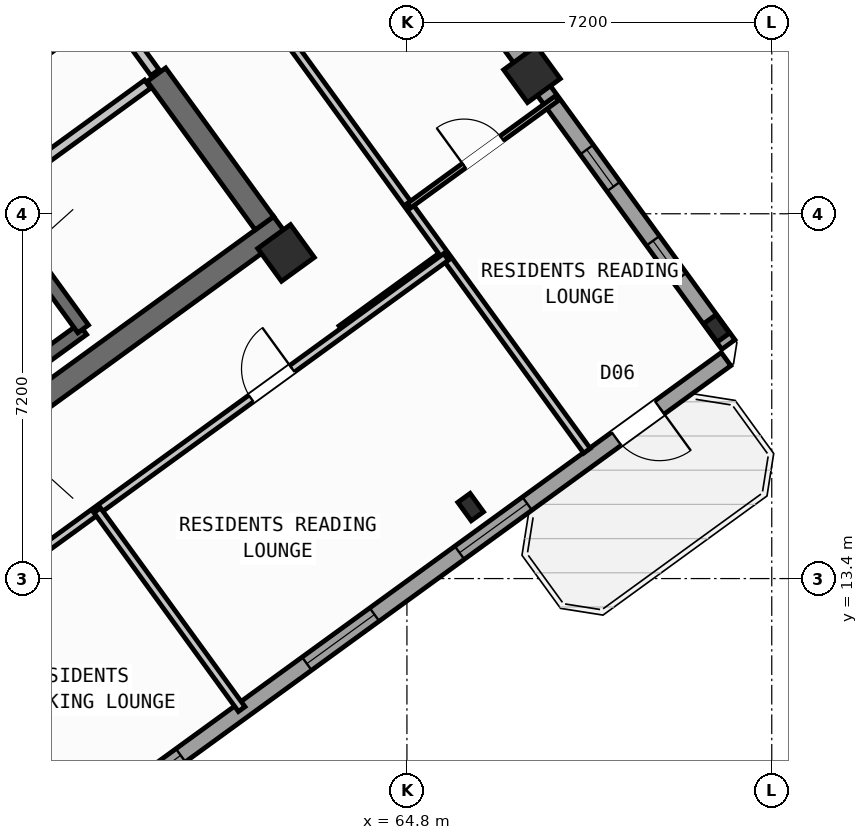
"""IFC4 building model, lengths in metres.
Left out: names, types, materials, properties, quantities, classifications, styles, units other than length and angle.
Written with IfcOpenShell. Run it as: python <this file> out.ifc"""

import sys

from ifc_helpers import new_model, si_unit, direction, frame, frame_2d, origin, origin_2d, place, context, subcontext, project, spatial, rectangle, hollow_rectangle, i_section, extrude, source, transform, mapped, element, fill, save


model = new_model("IFC4")
c1 = context("Model", 3, precision=1e-05, world=origin(), true_north=direction((0.0, 1.0)))
c2 = subcontext(c1, "Body", "Model", "MODEL_VIEW")
j1 = project(units=[si_unit("LENGTHUNIT", "METRE"), si_unit("PLANEANGLEUNIT", "RADIAN")], contexts=[c1])
p1 = place(None, origin())
s1 = spatial("IfcSite", under=j1, at=p1, CompositionType="ELEMENT")
p2 = place(p1, origin())
s2 = spatial("IfcBuilding", under=s1, at=p2, CompositionType="ELEMENT")
p3 = place(p2, frame((0.0, 0.0, 238.5)))
s3 = spatial("IfcBuildingStorey", under=s2, at=p3, CompositionType="ELEMENT", Elevation=238.5)
p4 = place(p3, frame((52.399, 13.169, 0.0), z_axis=(0.0, 0.0, 1.0), x_axis=(0.809022352778, 0.587777877013, 0.0)))
e1 = element("IfcWall", 1, at=p4, inside=s3, PredefinedType="SHEAR", context=c2, shape_type="SweptSolid", body=[
    extrude(rectangle(XDim=12.24, YDim=0.45, at=frame_2d((6.12, 0.0))), origin(), (0.0, 0.0, 1.0), 3.35),
])
p5 = place(p3, frame((61.988, 20.413, 0.0), z_axis=(0.0, 0.0, 1.0), x_axis=(-0.587819244441, 0.808992296542, 0.0)))
e2 = element("IfcWall", 2, at=p5, inside=s3, PredefinedType="SHEAR", context=c2, shape_type="SweptSolid", body=[
    extrude(rectangle(XDim=3.625, YDim=0.45, at=frame_2d((1.812, 0.0))), origin(), (0.0, 0.0, 1.0), 3.35),
])
m1 = source(origin(), c2, "Body", "SweptSolid", [
    extrude(i_section(OverallWidth=0.3, OverallDepth=0.45, WebThickness=0.014, FlangeThickness=0.026, at=origin_2d()), origin(), (0.0, 0.0, 1.0), 3.6),
])
p6 = place(p3, frame((66.058, 14.811, 0.0), z_axis=(0.0, 0.0, 1.0), x_axis=(0.809016994375, 0.587785252292, 0.0)))
e3 = element("IfcColumn", 3, at=p6, inside=s3, PredefinedType="COLUMN", context=c2, shape_type="MappedRepresentation", body=[
    mapped(m1, transform((0.0, 0.0, 0.0), scale=1.0)),
])
m2 = source(origin(), c2, "Body", "SweptSolid", [
    extrude(hollow_rectangle(XDim=0.8, YDim=0.8, WallThickness=0.032, at=origin_2d()), origin(), (0.0, 0.0, 1.0), 3.6),
])
p7 = place(p3, frame((62.414, 19.827, 0.0), z_axis=(0.0, 0.0, 1.0), x_axis=(0.809016994375, 0.587785252292, 0.0)))
e4 = element("IfcColumn", 4, at=p7, inside=s3, PredefinedType="COLUMN", context=c2, shape_type="MappedRepresentation", body=[
    mapped(m2, transform((0.0, 0.0, 0.0), scale=1.0)),
])
p8 = place(p3, frame((70.912, 18.338, 0.0), z_axis=(0.0, 0.0, 1.0), x_axis=(0.809016994375, 0.587785252292, 0.0)))
e5 = element("IfcColumn", 5, at=p8, inside=s3, PredefinedType="COLUMN", context=c2, shape_type="MappedRepresentation", body=[
    mapped(m1, transform((0.0, 0.0, 0.0), scale=1.0)),
])
p9 = place(p3, frame((67.268, 23.354, 0.0), z_axis=(0.0, 0.0, 1.0), x_axis=(0.809016994375, 0.587785252292, 0.0)))
e6 = element("IfcColumn", 6, at=p9, inside=s3, PredefinedType="COLUMN", context=c2, shape_type="MappedRepresentation", body=[
    mapped(m2, transform((0.0, 0.0, 0.0), scale=1.0)),
])
p10 = place(p3, frame((58.455, 35.484, 0.0), z_axis=(0.0, 0.0, 1.0), x_axis=(0.587783625747, -0.809018176127, 0.0)))
e7 = element("IfcWall", 7, at=p10, inside=s3, PredefinedType="STANDARD", context=c2, shape_type="SweptSolid", body=[
    extrude(rectangle(XDim=21.587, YDim=0.32, at=frame_2d((10.794, 0.0))), origin(), (0.0, 0.0, 1.0), 2.875),
])
p11 = place(p10, frame((1.554, 0.0, 0.9)))
e8 = element("IfcOpeningElement", 8, at=p11, cuts=e7, PredefinedType="OPENING", context=c2, shape_type="SweptSolid", body=[
    extrude(rectangle(XDim=1.65, YDim=1.45, at=frame_2d((0.825, 0.725))), frame((0.0, 0.17, 0.0), z_axis=(0.0, -1.0, 0.0), x_axis=(1.0, 0.0, 0.0)), (0.0, 0.0, 1.0), 0.34),
])
p12 = place(p10, frame((9.219, 0.0, 0.9)))
e9 = element("IfcOpeningElement", 9, at=p12, cuts=e7, PredefinedType="OPENING", context=c2, shape_type="SweptSolid", body=[
    extrude(rectangle(XDim=1.35, YDim=1.45, at=frame_2d((0.675, 0.725))), frame((0.0, 0.17, 0.0), z_axis=(0.0, -1.0, 0.0), x_axis=(1.0, 0.0, 0.0)), (0.0, 0.0, 1.0), 0.34),
])
p13 = place(p10, frame((12.119, 0.0, 0.9)))
e10 = element("IfcOpeningElement", 10, at=p13, cuts=e7, PredefinedType="OPENING", context=c2, shape_type="SweptSolid", body=[
    extrude(rectangle(XDim=1.35, YDim=1.45, at=frame_2d((0.675, 0.725))), frame((0.0, 0.17, 0.0), z_axis=(0.0, -1.0, 0.0), x_axis=(1.0, 0.0, 0.0)), (0.0, 0.0, 1.0), 0.34),
])
p14 = place(p10, frame((16.833, 0.0, 1.0)))
e11 = element("IfcOpeningElement", 11, at=p14, cuts=e7, PredefinedType="OPENING", context=c2, shape_type="SweptSolid", body=[
    extrude(rectangle(XDim=0.9, YDim=1.25, at=frame_2d((0.45, 0.625))), frame((0.0, 0.17, 0.0), z_axis=(0.0, -1.0, 0.0), x_axis=(1.0, 0.0, 0.0)), (0.0, 0.0, 1.0), 0.34),
])
p15 = place(p10, frame((19.057, 0.0, 1.0)))
e12 = element("IfcOpeningElement", 12, at=p15, cuts=e7, PredefinedType="OPENING", context=c2, shape_type="SweptSolid", body=[
    extrude(rectangle(XDim=0.9, YDim=1.25, at=frame_2d((0.45, 0.625))), frame((0.0, 0.17, 0.0), z_axis=(0.0, -1.0, 0.0), x_axis=(1.0, 0.0, 0.0)), (0.0, 0.0, 1.0), 0.34),
])
p16 = place(p3, frame((71.098, 17.731, 0.0), z_axis=(0.0, 0.0, 1.0), x_axis=(-0.809021120468, -0.587779573171, 0.0)))
e13 = element("IfcWall", 13, at=p16, inside=s3, PredefinedType="STANDARD", context=c2, shape_type="SweptSolid", body=[
    extrude(rectangle(XDim=17.588, YDim=0.32, at=frame_2d((8.794, 0.0))), origin(), (0.0, 0.0, 1.0), 3.35),
])
p17 = place(p16, frame((1.624, 0.0, 0.0)))
e14 = element("IfcOpeningElement", 14, at=p17, cuts=e13, PredefinedType="OPENING", context=c2, shape_type="SweptSolid", body=[
    extrude(rectangle(XDim=1.05, YDim=2.15, at=frame_2d((0.525, 1.075))), frame((0.0, 0.17, 0.0), z_axis=(0.0, -1.0, 0.0), x_axis=(1.0, 0.0, 0.0)), (0.0, 0.0, 1.0), 0.34),
])
p18 = place(p16, frame((4.851, 0.0, 0.9)))
e15 = element("IfcOpeningElement", 15, at=p18, cuts=e13, PredefinedType="OPENING", context=c2, shape_type="SweptSolid", body=[
    extrude(rectangle(XDim=1.65, YDim=1.45, at=frame_2d((0.825, 0.725))), frame((0.0, 0.17, 0.0), z_axis=(0.0, -1.0, 0.0), x_axis=(1.0, 0.0, 0.0)), (0.0, 0.0, 1.0), 0.34),
])
p19 = place(p16, frame((8.576, 0.0, 0.9)))
e16 = element("IfcOpeningElement", 16, at=p19, cuts=e13, PredefinedType="OPENING", context=c2, shape_type="SweptSolid", body=[
    extrude(rectangle(XDim=1.65, YDim=1.45, at=frame_2d((0.825, 0.725))), frame((0.0, 0.17, 0.0), z_axis=(0.0, -1.0, 0.0), x_axis=(1.0, 0.0, 0.0)), (0.0, 0.0, 1.0), 0.34),
])
p20 = place(p16, frame((13.304, 0.0, 0.95)))
e17 = element("IfcOpeningElement", 17, at=p20, cuts=e13, PredefinedType="OPENING", context=c2, shape_type="SweptSolid", body=[
    extrude(rectangle(XDim=1.95, YDim=1.35, at=frame_2d((0.975, 0.675))), frame((0.0, 0.17, 0.0), z_axis=(0.0, -1.0, 0.0), x_axis=(1.0, 0.0, 0.0)), (0.0, 0.0, 1.0), 0.34),
])
p21 = place(p3, frame((52.472, 14.013, 0.0), z_axis=(0.0, 0.0, 1.0), x_axis=(0.809028366311, 0.587769599847, 0.0)))
e18 = element("IfcWall", 18, at=p21, inside=s3, PredefinedType="SHEAR", context=c2, shape_type="SweptSolid", body=[
    extrude(rectangle(XDim=7.33, YDim=0.26, at=frame_2d((3.665, 0.0))), origin(), (0.0, 0.0, 1.0), 3.35),
])
p22 = place(p3, frame((58.41, 18.327, 0.0), z_axis=(0.0, 0.0, 1.0), x_axis=(-0.58776738483, 0.809029975545, 0.0)))
e19 = element("IfcWall", 19, at=p22, inside=s3, PredefinedType="SHEAR", context=c2, shape_type="SweptSolid", body=[
    extrude(rectangle(XDim=3.16, YDim=0.26, at=frame_2d((1.58, 0.0))), origin(), (0.0, 0.0, 1.0), 3.35),
])
p23 = place(p3, frame((56.553, 20.884, 0.0), z_axis=(0.0, 0.0, 1.0), x_axis=(0.809041669066, 0.587751288995, 0.0)))
e20 = element("IfcWall", 20, at=p23, inside=s3, PredefinedType="STANDARD", context=c2, shape_type="SweptSolid", body=[
    extrude(rectangle(XDim=3.868, YDim=0.2, at=frame_2d((1.934, 0.0))), origin(), (0.0, 0.0, 1.0), 3.34),
])
p24 = place(p23, frame((0.55, 0.0, 0.0)))
e21 = element("IfcOpeningElement", 21, at=p24, cuts=e20, PredefinedType="OPENING", context=c2, shape_type="SweptSolid", body=[
    extrude(rectangle(XDim=0.86, YDim=2.05, at=frame_2d((0.43, 1.025))), frame((0.0, 0.11, 0.0), z_axis=(0.0, -1.0, 0.0), x_axis=(1.0, 0.0, 0.0)), (0.0, 0.0, 1.0), 0.22),
])
p25 = place(p3, frame((54.421, 21.436, 0.0), z_axis=(0.0, 0.0, 1.0), x_axis=(0.809013710463, 0.587789772183, 0.0)))
e22 = element("IfcWall", 22, at=p25, inside=s3, PredefinedType="PARTITIONING", context=c2, shape_type="SweptSolid", body=[
    extrude(rectangle(XDim=5.36, YDim=0.16, at=frame_2d((2.68, 0.0))), origin(), (0.0, 0.0, 1.0), 3.34),
])
p26 = place(p25, frame((1.4, 0.0, 0.0)))
e23 = element("IfcOpeningElement", 23, at=p26, cuts=e22, PredefinedType="OPENING", context=c2, shape_type="SweptSolid", body=[
    extrude(rectangle(XDim=0.86, YDim=2.05, at=frame_2d((0.43, 1.025))), frame((0.0, 0.09, 0.0), z_axis=(0.0, -1.0, 0.0), x_axis=(1.0, 0.0, 0.0)), (0.0, 0.0, 1.0), 0.18),
])
p27 = place(p3, frame((53.425, 22.468, 0.0), z_axis=(0.0, 0.0, 1.0), x_axis=(0.809015945709, 0.587786695655, 0.0)))
e24 = element("IfcWall", 24, at=p27, inside=s3, PredefinedType="STANDARD", context=c2, shape_type="SweptSolid", body=[
    extrude(rectangle(XDim=5.468, YDim=0.2, at=frame_2d((2.734, 0.0))), origin(), (0.0, 0.0, 1.0), 3.34),
])
p28 = place(p27, frame((4.4, 0.0, 0.0)))
e25 = element("IfcOpeningElement", 25, at=p28, cuts=e24, PredefinedType="OPENING", context=c2, shape_type="SweptSolid", body=[
    extrude(rectangle(XDim=0.86, YDim=2.05, at=frame_2d((0.43, 1.025))), frame((0.0, 0.11, 0.0), z_axis=(0.0, -1.0, 0.0), x_axis=(1.0, 0.0, 0.0)), (0.0, 0.0, 1.0), 0.22),
])
p29 = place(p27, frame((1.45, 0.0, 0.0)))
e26 = element("IfcOpeningElement", 26, at=p29, cuts=e24, PredefinedType="OPENING", context=c2, shape_type="SweptSolid", body=[
    extrude(rectangle(XDim=0.86, YDim=2.05, at=frame_2d((0.43, 1.025))), frame((0.0, 0.11, 0.0), z_axis=(0.0, -1.0, 0.0), x_axis=(1.0, 0.0, 0.0)), (0.0, 0.0, 1.0), 0.22),
])
p30 = place(p3, frame((59.827, 23.386, 0.0), z_axis=(0.0, 0.0, 1.0), x_axis=(-0.587803840107, 0.809003489211, 0.0)))
e27 = element("IfcWall", 27, at=p30, inside=s3, PredefinedType="STANDARD", context=c2, shape_type="SweptSolid", body=[
    extrude(rectangle(XDim=2.96, YDim=0.2, at=frame_2d((1.48, 0.0))), origin(), (0.0, 0.0, 1.0), 3.34),
])
p31 = place(p30, frame((1.68, 0.0, 0.0)))
e28 = element("IfcOpeningElement", 28, at=p31, cuts=e27, PredefinedType="OPENING", context=c2, shape_type="SweptSolid", body=[
    extrude(rectangle(XDim=1.0, YDim=2.1, at=frame_2d((0.5, 1.05))), frame((0.0, 0.11, 0.0), z_axis=(0.0, -1.0, 0.0), x_axis=(1.0, 0.0, 0.0)), (0.0, 0.0, 1.0), 0.22),
])
p32 = place(p3, frame((63.507, 18.322, 0.0), z_axis=(0.0, 0.0, 1.0), x_axis=(0.809034604122, 0.587761013791, 0.0)))
e29 = element("IfcWall", 29, at=p32, inside=s3, PredefinedType="PARTITIONING", context=c2, shape_type="SweptSolid", body=[
    extrude(rectangle(XDim=2.51, YDim=0.16, at=frame_2d((1.255, 0.0))), origin(), (0.0, 0.0, 1.0), 3.34),
])
p33 = place(p3, frame((68.353, 15.922, 0.0), z_axis=(0.0, 0.0, 1.0), x_axis=(-0.587782002009, 0.809019355834, 0.0)))
e30 = element("IfcWall", 30, at=p33, inside=s3, PredefinedType="PARTITIONING", context=c2, shape_type="SweptSolid", body=[
    extrude(rectangle(XDim=15.35, YDim=0.16, at=frame_2d((7.675, 0.0))), origin(), (0.0, 0.0, 1.0), 3.34),
])
p34 = place(p3, frame((64.839, 20.759, 0.0), z_axis=(0.0, 0.0, 1.0), x_axis=(0.809013833588, 0.587789602718, 0.0)))
e31 = element("IfcWall", 31, at=p34, inside=s3, PredefinedType="PARTITIONING", context=c2, shape_type="SweptSolid", body=[
    extrude(rectangle(XDim=3.61, YDim=0.11, at=frame_2d((1.805, 0.0))), origin(), (0.0, 0.0, 1.0), 3.34),
])
p35 = place(p34, frame((1.345, 0.0, 0.0)))
e32 = element("IfcOpeningElement", 32, at=p35, cuts=e31, PredefinedType="OPENING", context=c2, shape_type="SweptSolid", body=[
    extrude(rectangle(XDim=0.92, YDim=2.08, at=frame_2d((0.46, 1.04))), frame((0.0, 0.065, 0.0), z_axis=(0.0, -1.0, 0.0), x_axis=(1.0, 0.0, 0.0)), (0.0, 0.0, 1.0), 0.13),
])
p36 = place(p3, frame((53.705, 11.126, 0.0), z_axis=(0.0, 0.0, 1.0), x_axis=(0.809014504436, 0.587788679384, 0.0)))
e33 = element("IfcWall", 33, at=p36, inside=s3, PredefinedType="PARTITIONING", context=c2, shape_type="SweptSolid", body=[
    extrude(rectangle(XDim=14.67, YDim=0.16, at=frame_2d((7.335, 0.0))), origin(), (0.0, 0.0, 1.0), 3.34),
])
p37 = place(p36, frame((3.215, 0.0, 0.0)))
e34 = element("IfcOpeningElement", 34, at=p37, cuts=e33, PredefinedType="OPENING", context=c2, shape_type="SweptSolid", body=[
    extrude(rectangle(XDim=1.0, YDim=2.1, at=frame_2d((0.5, 1.05))), frame((0.0, 0.09, 0.0), z_axis=(0.0, -1.0, 0.0), x_axis=(1.0, 0.0, 0.0)), (0.0, 0.0, 1.0), 0.18),
])
p38 = place(p36, frame((9.915, 0.0, 0.0)))
e35 = element("IfcOpeningElement", 35, at=p38, cuts=e33, PredefinedType="OPENING", context=c2, shape_type="SweptSolid", body=[
    extrude(rectangle(XDim=1.0, YDim=2.1, at=frame_2d((0.5, 1.05))), frame((0.0, 0.09, 0.0), z_axis=(0.0, -1.0, 0.0), x_axis=(1.0, 0.0, 0.0)), (0.0, 0.0, 1.0), 0.18),
])
p39 = place(p3, frame((57.747, 7.586, 0.0), z_axis=(0.0, 0.0, 1.0), x_axis=(-0.587784893399, 0.809017255126, 0.0)))
e36 = element("IfcWall", 36, at=p39, inside=s3, PredefinedType="PARTITIONING", context=c2, shape_type="SweptSolid", body=[
    extrude(rectangle(XDim=5.48, YDim=0.16, at=frame_2d((2.74, 0.0))), origin(), (0.0, 0.0, 1.0), 3.34),
])
p40 = place(p3, frame((61.539, 10.823, 0.0), z_axis=(0.0, 0.0, 1.0), x_axis=(-0.587785532001, 0.809016791155, 0.0)))
e37 = element("IfcWall", 37, at=p40, inside=s3, PredefinedType="PARTITIONING", context=c2, shape_type="SweptSolid", body=[
    extrude(rectangle(XDim=4.85, YDim=0.16, at=frame_2d((2.425, 0.0))), origin(), (0.0, 0.0, 1.0), 3.34),
])
m3 = source(origin(), c2, "Body", "SweptSolid", [
    extrude(rectangle(XDim=1.05, YDim=2.15, at=frame_2d((0.525, 1.075))), frame((0.0, 0.025, 0.0), z_axis=(0.0, -1.0, 0.0), x_axis=(1.0, 0.0, 0.0)), (0.0, 0.0, 1.0), 0.05),
])
p41 = place(p17, origin())
e38 = element("IfcDoor", 38, at=p41, inside=s3, OperationType="SINGLE_SWING_LEFT", PredefinedType="DOOR", context=c2, shape_type="MappedRepresentation", body=[
    mapped(m3, transform((0.0, 0.0, 0.0), scale=1.0)),
])
fill(e14, e38)
m4 = source(origin(), c2, "Body", "SweptSolid", [
    extrude(rectangle(XDim=0.9, YDim=1.25, at=frame_2d((0.45, 0.625))), frame((0.0, 0.03, 0.0), z_axis=(0.0, -1.0, 0.0), x_axis=(1.0, 0.0, 0.0)), (0.0, 0.0, 1.0), 0.06),
])
p42 = place(p14, origin())
e39 = element("IfcWindow", 39, at=p42, inside=s3, PartitioningType="SINGLE_PANEL", PredefinedType="WINDOW", context=c2, shape_type="MappedRepresentation", body=[
    mapped(m4, transform((0.0, 0.0, 0.0), scale=1.0)),
])
fill(e11, e39)
p43 = place(p15, origin())
e40 = element("IfcWindow", 40, at=p43, inside=s3, PartitioningType="SINGLE_PANEL", PredefinedType="WINDOW", context=c2, shape_type="MappedRepresentation", body=[
    mapped(m4, transform((0.0, 0.0, 0.0), scale=1.0)),
])
fill(e12, e40)
m5 = source(origin(), c2, "Body", "SweptSolid", [
    extrude(rectangle(XDim=1.65, YDim=1.45, at=frame_2d((0.825, 0.725))), frame((0.0, 0.03, 0.0), z_axis=(0.0, -1.0, 0.0), x_axis=(1.0, 0.0, 0.0)), (0.0, 0.0, 1.0), 0.06),
])
p44 = place(p18, origin())
e41 = element("IfcWindow", 41, at=p44, inside=s3, PartitioningType="SINGLE_PANEL", PredefinedType="WINDOW", context=c2, shape_type="MappedRepresentation", body=[
    mapped(m5, transform((0.0, 0.0, 0.0), scale=1.0)),
])
fill(e15, e41)
p45 = place(p19, origin())
e42 = element("IfcWindow", 42, at=p45, inside=s3, PartitioningType="SINGLE_PANEL", PredefinedType="WINDOW", context=c2, shape_type="MappedRepresentation", body=[
    mapped(m5, transform((0.0, 0.0, 0.0), scale=1.0)),
])
fill(e16, e42)
m6 = source(origin(), c2, "Body", "SweptSolid", [
    extrude(rectangle(XDim=1.95, YDim=1.35, at=frame_2d((0.975, 0.675))), frame((0.0, 0.03, 0.0), z_axis=(0.0, -1.0, 0.0), x_axis=(1.0, 0.0, 0.0)), (0.0, 0.0, 1.0), 0.06),
])
p46 = place(p20, origin())
e43 = element("IfcWindow", 43, at=p46, inside=s3, PartitioningType="SINGLE_PANEL", PredefinedType="WINDOW", context=c2, shape_type="MappedRepresentation", body=[
    mapped(m6, transform((0.0, 0.0, 0.0), scale=1.0)),
])
fill(e17, e43)
m7 = source(origin(), c2, "Body", "SweptSolid", [
    extrude(rectangle(XDim=0.92, YDim=2.08, at=frame_2d((0.46, 1.04))), frame((0.0, 0.025, 0.0), z_axis=(0.0, -1.0, 0.0), x_axis=(1.0, 0.0, 0.0)), (0.0, 0.0, 1.0), 0.05),
])
p47 = place(p35, origin())
e44 = element("IfcDoor", 44, at=p47, inside=s3, OperationType="SINGLE_SWING_LEFT", PredefinedType="DOOR", context=c2, shape_type="MappedRepresentation", body=[
    mapped(m7, transform((0.0, 0.0, 0.0), scale=1.0)),
])
fill(e32, e44)
m8 = source(origin(), c2, "Body", "SweptSolid", [
    extrude(rectangle(XDim=1.0, YDim=2.1, at=frame_2d((0.5, 1.05))), frame((0.0, 0.025, 0.0), z_axis=(0.0, -1.0, 0.0), x_axis=(1.0, 0.0, 0.0)), (0.0, 0.0, 1.0), 0.05),
])
p48 = place(p38, origin())
e45 = element("IfcDoor", 45, at=p48, inside=s3, OperationType="SINGLE_SWING_RIGHT", PredefinedType="DOOR", context=c2, shape_type="MappedRepresentation", body=[
    mapped(m8, transform((0.0, 0.0, 0.0), scale=1.0)),
])
fill(e35, e45)
save(model, sys.argv[1])
